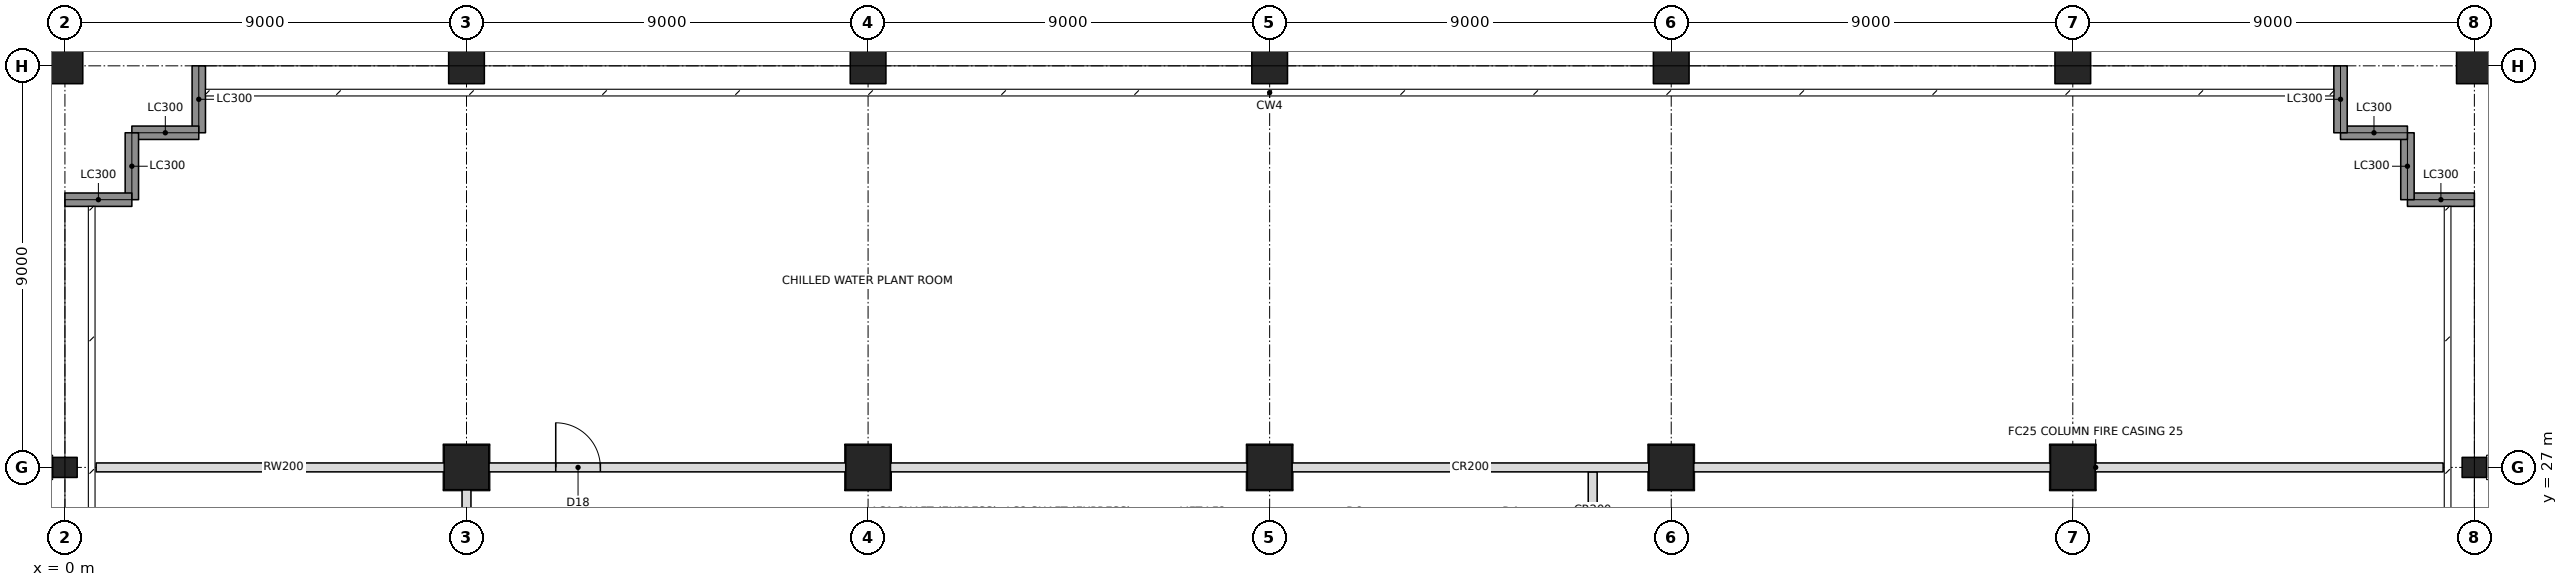
"""IFC4 building model, lengths in metres.
Left out: names, types, materials, properties, quantities, classifications, styles, units other than length and angle.
Written with IfcOpenShell. Run it as: python <this file> out.ifc"""

import sys

from ifc_helpers import new_model, si_unit, direction, frame, frame_2d, origin, origin_2d, place, context, subcontext, project, spatial, rectangle, hollow_rectangle, i_section, extrude, element, fill, save


model = new_model("IFC4")
c1 = context("Model", 3, precision=1e-05, world=origin(), true_north=direction((0.0, 1.0)))
c2 = subcontext(c1, "Body", "Model", "MODEL_VIEW")
j1 = project(units=[si_unit("LENGTHUNIT", "METRE"), si_unit("PLANEANGLEUNIT", "RADIAN")], contexts=[c1])
p1 = place(None, origin())
s1 = spatial("IfcSite", under=j1, at=p1, CompositionType="ELEMENT")
p2 = place(p1, origin())
s2 = spatial("IfcBuilding", under=s1, at=p2, CompositionType="ELEMENT")
p3 = place(p2, frame((0.0, 0.0, 89.2)))
s3 = spatial("IfcBuildingStorey", under=s2, at=p3, CompositionType="ELEMENT", Elevation=89.2)
p4 = place(p3, frame((0.0, 27.0, 0.0), z_axis=(0.0, 0.0, 1.0), x_axis=(0.0, 1.0, 0.0)))
e1 = element("IfcColumn", 1, at=p4, inside=s3, PredefinedType="COLUMN", context=c2, shape_type="SweptSolid", body=[
    extrude(i_section(OverallWidth=0.449, OverallDepth=0.549, WebThickness=0.072, FlangeThickness=0.115, at=origin_2d()), origin(), (0.0, 0.0, 1.0), 5.0),
])
p5 = place(p3, frame((0.0, 36.0, 0.0), z_axis=(0.0, 0.0, 1.0), x_axis=(1.0, 0.0, 0.0)))
e2 = element("IfcColumn", 2, at=p5, inside=s3, PredefinedType="COLUMN", context=c2, shape_type="SweptSolid", body=[
    extrude(hollow_rectangle(XDim=0.8, YDim=0.8, WallThickness=0.07, at=origin_2d()), origin(), (0.0, 0.0, 1.0), 5.0),
])
p6 = place(p3, frame((9.0, 27.0, 0.0), z_axis=(0.0, 0.0, 1.0), x_axis=(1.0, 0.0, 0.0)))
e3 = element("IfcColumn", 3, at=p6, inside=s3, PredefinedType="COLUMN", context=c2, shape_type="SweptSolid", body=[
    extrude(hollow_rectangle(XDim=1.0, YDim=1.0, WallThickness=0.1, at=origin_2d()), origin(), (0.0, 0.0, 1.0), 5.0),
])
p7 = place(p3, frame((9.0, 36.0, 0.0), z_axis=(0.0, 0.0, 1.0), x_axis=(1.0, 0.0, 0.0)))
e4 = element("IfcColumn", 4, at=p7, inside=s3, PredefinedType="COLUMN", context=c2, shape_type="SweptSolid", body=[
    extrude(hollow_rectangle(XDim=0.8, YDim=0.8, WallThickness=0.07, at=origin_2d()), origin(), (0.0, 0.0, 1.0), 5.0),
])
p8 = place(p3, frame((18.0, 27.0, 0.0), z_axis=(0.0, 0.0, 1.0), x_axis=(1.0, 0.0, 0.0)))
e5 = element("IfcColumn", 5, at=p8, inside=s3, PredefinedType="COLUMN", context=c2, shape_type="SweptSolid", body=[
    extrude(hollow_rectangle(XDim=1.0, YDim=1.0, WallThickness=0.1, at=origin_2d()), origin(), (0.0, 0.0, 1.0), 5.0),
])
p9 = place(p3, frame((18.0, 36.0, 0.0), z_axis=(0.0, 0.0, 1.0), x_axis=(1.0, 0.0, 0.0)))
e6 = element("IfcColumn", 6, at=p9, inside=s3, PredefinedType="COLUMN", context=c2, shape_type="SweptSolid", body=[
    extrude(hollow_rectangle(XDim=0.8, YDim=0.8, WallThickness=0.07, at=origin_2d()), origin(), (0.0, 0.0, 1.0), 5.0),
])
p10 = place(p3, frame((27.0, 27.0, 0.0), z_axis=(0.0, 0.0, 1.0), x_axis=(1.0, 0.0, 0.0)))
e7 = element("IfcColumn", 7, at=p10, inside=s3, PredefinedType="COLUMN", context=c2, shape_type="SweptSolid", body=[
    extrude(hollow_rectangle(XDim=1.0, YDim=1.0, WallThickness=0.1, at=origin_2d()), origin(), (0.0, 0.0, 1.0), 5.0),
])
p11 = place(p3, frame((27.0, 36.0, 0.0), z_axis=(0.0, 0.0, 1.0), x_axis=(1.0, 0.0, 0.0)))
e8 = element("IfcColumn", 8, at=p11, inside=s3, PredefinedType="COLUMN", context=c2, shape_type="SweptSolid", body=[
    extrude(hollow_rectangle(XDim=0.8, YDim=0.8, WallThickness=0.07, at=origin_2d()), origin(), (0.0, 0.0, 1.0), 5.0),
])
p12 = place(p3, frame((36.0, 27.0, 0.0), z_axis=(0.0, 0.0, 1.0), x_axis=(1.0, 0.0, 0.0)))
e9 = element("IfcColumn", 9, at=p12, inside=s3, PredefinedType="COLUMN", context=c2, shape_type="SweptSolid", body=[
    extrude(hollow_rectangle(XDim=1.0, YDim=1.0, WallThickness=0.1, at=origin_2d()), origin(), (0.0, 0.0, 1.0), 5.0),
])
p13 = place(p3, frame((36.0, 36.0, 0.0), z_axis=(0.0, 0.0, 1.0), x_axis=(1.0, 0.0, 0.0)))
e10 = element("IfcColumn", 10, at=p13, inside=s3, PredefinedType="COLUMN", context=c2, shape_type="SweptSolid", body=[
    extrude(hollow_rectangle(XDim=0.8, YDim=0.8, WallThickness=0.07, at=origin_2d()), origin(), (0.0, 0.0, 1.0), 5.0),
])
p14 = place(p3, frame((45.0, 27.0, 0.0), z_axis=(0.0, 0.0, 1.0), x_axis=(0.0, 1.0, 0.0)))
e11 = element("IfcColumn", 11, at=p14, inside=s3, PredefinedType="COLUMN", context=c2, shape_type="SweptSolid", body=[
    extrude(hollow_rectangle(XDim=1.0, YDim=1.0, WallThickness=0.1, at=origin_2d()), origin(), (0.0, 0.0, 1.0), 5.0),
])
p15 = place(p3, frame((45.0, 36.0, 0.0), z_axis=(0.0, 0.0, 1.0), x_axis=(1.0, 0.0, 0.0)))
e12 = element("IfcColumn", 12, at=p15, inside=s3, PredefinedType="COLUMN", context=c2, shape_type="SweptSolid", body=[
    extrude(hollow_rectangle(XDim=0.8, YDim=0.8, WallThickness=0.07, at=origin_2d()), origin(), (0.0, 0.0, 1.0), 5.0),
])
p16 = place(p3, frame((54.0, 27.0, 0.0), z_axis=(0.0, 0.0, 1.0), x_axis=(0.0, 1.0, 0.0)))
e13 = element("IfcColumn", 13, at=p16, inside=s3, PredefinedType="COLUMN", context=c2, shape_type="SweptSolid", body=[
    extrude(i_section(OverallWidth=0.449, OverallDepth=0.549, WebThickness=0.072, FlangeThickness=0.115, at=origin_2d()), origin(), (0.0, 0.0, 1.0), 5.0),
])
p17 = place(p3, frame((54.0, 36.0, 0.0), z_axis=(0.0, 0.0, 1.0), x_axis=(1.0, 0.0, 0.0)))
e14 = element("IfcColumn", 14, at=p17, inside=s3, PredefinedType="COLUMN", context=c2, shape_type="SweptSolid", body=[
    extrude(hollow_rectangle(XDim=0.8, YDim=0.8, WallThickness=0.07, at=origin_2d()), origin(), (0.0, 0.0, 1.0), 5.0),
])
p18 = place(p3, frame((54.0, 33.0, 0.0), z_axis=(0.0, 0.0, 1.0), x_axis=(-1.0, 0.0, 0.0)))
e15 = element("IfcWall", 15, at=p18, inside=s3, PredefinedType="SOLIDWALL", context=c2, shape_type="SweptSolid", body=[
    extrude(rectangle(XDim=1.5, YDim=0.3, at=frame_2d((0.75, 0.0))), origin(), (0.0, 0.0, 1.0), 3.852),
])
for number, where, z_axis, x_axis in (
    (16, (52.5, 33.0, 0.0), (0.0, 0.0, 1.0), (0.0, 1.0, 0.0)),
    (17, (52.5, 34.5, 0.0), (0.0, 0.0, 1.0), (-1.0, 0.0, 0.0)),
):
    element("IfcWall", number, at=place(p3, frame(where, z_axis=z_axis, x_axis=x_axis)), inside=s3, PredefinedType="SOLIDWALL", context=c2, shape_type="SweptSolid", body=[
        extrude(rectangle(XDim=1.5, YDim=0.3, at=frame_2d((0.75, 0.0))), origin(), (0.0, 0.0, 1.0), 4.8),
    ])
for number, where, z_axis, x_axis in (
    (18, (51.0, 34.5, 0.0), (0.0, 0.0, 1.0), (0.0, 1.0, 0.0)),
    (19, (3.0, 36.0, 0.0), (0.0, 0.0, 1.0), (0.0, -1.0, 0.0)),
):
    element("IfcWall", number, at=place(p3, frame(where, z_axis=z_axis, x_axis=x_axis)), inside=s3, PredefinedType="SOLIDWALL", context=c2, shape_type="SweptSolid", body=[
        extrude(rectangle(XDim=1.5, YDim=0.3, at=frame_2d((0.75, 0.0))), origin(), (0.0, 0.0, 1.0), 3.852),
    ])
for number, where, z_axis, x_axis in (
    (20, (3.0, 34.5, 0.0), (0.0, 0.0, 1.0), (-1.0, 0.0, 0.0)),
    (21, (1.5, 34.5, 0.0), (0.0, 0.0, 1.0), (0.0, -1.0, 0.0)),
):
    element("IfcWall", number, at=place(p3, frame(where, z_axis=z_axis, x_axis=x_axis)), inside=s3, PredefinedType="SOLIDWALL", context=c2, shape_type="SweptSolid", body=[
        extrude(rectangle(XDim=1.5, YDim=0.3, at=frame_2d((0.75, 0.0))), origin(), (0.0, 0.0, 1.0), 4.8),
    ])
p19 = place(p3, frame((1.5, 33.0, 0.0), z_axis=(0.0, 0.0, 1.0), x_axis=(-1.0, 0.0, 0.0)))
e22 = element("IfcWall", 22, at=p19, inside=s3, PredefinedType="SOLIDWALL", context=c2, shape_type="SweptSolid", body=[
    extrude(rectangle(XDim=1.5, YDim=0.3, at=frame_2d((0.75, 0.0))), origin(), (0.0, 0.0, 1.0), 3.852),
])
p20 = place(p3, frame((9.0, 18.5, 0.0), z_axis=(0.0, 0.0, 1.0), x_axis=(0.0, 1.0, 0.0)))
e23 = element("IfcWall", 23, at=p20, inside=s3, PredefinedType="PARTITIONING", context=c2, shape_type="SweptSolid", body=[
    extrude(rectangle(XDim=8.0, YDim=0.2, at=frame_2d((4.0, 0.0))), origin(), (0.0, 0.0, 1.0), 4.005),
])
p21 = place(p3, frame((0.7, 27.0, 0.0), z_axis=(0.0, 0.0, 1.0), x_axis=(1.0, 0.0, 0.0)))
e24 = element("IfcWall", 24, at=p21, inside=s3, PredefinedType="PARTITIONING", context=c2, shape_type="SweptSolid", body=[
    extrude(rectangle(XDim=8.4, YDim=0.2, at=frame_2d((4.2, 0.0))), origin(), (0.0, 0.0, 1.0), 4.005),
])
p22 = place(p3, frame((9.5, 27.0, 0.0), z_axis=(0.0, 0.0, 1.0), x_axis=(1.0, 0.0, 0.0)))
e25 = element("IfcWall", 25, at=p22, inside=s3, PredefinedType="PARTITIONING", context=c2, shape_type="SweptSolid", body=[
    extrude(rectangle(XDim=8.0, YDim=0.2, at=frame_2d((4.0, 0.0))), origin(), (0.0, 0.0, 1.0), 4.005),
])
p23 = place(p22, frame((1.5, 0.0, 0.0)))
e26 = element("IfcOpeningElement", 26, at=p23, cuts=e25, PredefinedType="OPENING", context=c2, shape_type="SweptSolid", body=[
    extrude(rectangle(XDim=1.0, YDim=2.1, at=frame_2d((0.5, 1.05))), frame((0.0, 0.11, 0.0), z_axis=(0.0, -1.0, 0.0), x_axis=(1.0, 0.0, 0.0)), (0.0, 0.0, 1.0), 0.22),
])
for number, where, z_axis, x_axis in (
    (27, (18.5, 27.0, 0.0), (0.0, 0.0, 1.0), (1.0, 0.0, 0.0)),
    (28, (27.5, 27.0, 0.0), (0.0, 0.0, 1.0), (1.0, 0.0, 0.0)),
):
    element("IfcWall", number, at=place(p3, frame(where, z_axis=z_axis, x_axis=x_axis)), inside=s3, PredefinedType="PARTITIONING", context=c2, shape_type="SweptSolid", body=[
        extrude(rectangle(XDim=8.0, YDim=0.2, at=frame_2d((4.0, 0.0))), origin(), (0.0, 0.0, 1.0), 4.005),
    ])
p24 = place(p3, frame((36.5, 27.0, 0.0), z_axis=(0.0, 0.0, 1.0), x_axis=(1.0, 0.0, 0.0)))
e29 = element("IfcWall", 29, at=p24, inside=s3, PredefinedType="PARTITIONING", context=c2, shape_type="SweptSolid", body=[
    extrude(rectangle(XDim=8.0, YDim=0.2, at=frame_2d((4.0, 0.0))), origin(), (0.0, 0.0, 1.0), 4.038),
])
p25 = place(p3, frame((45.5, 27.0, 0.0), z_axis=(0.0, 0.0, 1.0), x_axis=(1.0, 0.0, 0.0)))
e30 = element("IfcWall", 30, at=p25, inside=s3, PredefinedType="PARTITIONING", context=c2, shape_type="SweptSolid", body=[
    extrude(rectangle(XDim=7.8, YDim=0.2, at=frame_2d((3.9, 0.0))), origin(), (0.0, 0.0, 1.0), 4.038),
])
p26 = place(p3, frame((34.24, 25.2, 0.0), z_axis=(0.0, 0.0, 1.0), x_axis=(0.0, 1.0, 0.0)))
e31 = element("IfcWall", 31, at=p26, inside=s3, PredefinedType="PARTITIONING", context=c2, shape_type="SweptSolid", body=[
    extrude(rectangle(XDim=1.7, YDim=0.2, at=frame_2d((0.85, 0.0))), origin(), (0.0, 0.0, 1.0), 4.004),
])
p27 = place(p23, origin())
e32 = element("IfcDoor", 32, at=p27, inside=s3, OperationType="SINGLE_SWING_LEFT", PredefinedType="DOOR", context=c2, shape_type="SweptSolid", body=[
    extrude(rectangle(XDim=1.0, YDim=2.1, at=frame_2d((0.5, 1.05))), frame((0.0, 0.025, 0.0), z_axis=(0.0, -1.0, 0.0), x_axis=(1.0, 0.0, 0.0)), (0.0, 0.0, 1.0), 0.05),
])
fill(e26, e32)
save(model, sys.argv[1])
